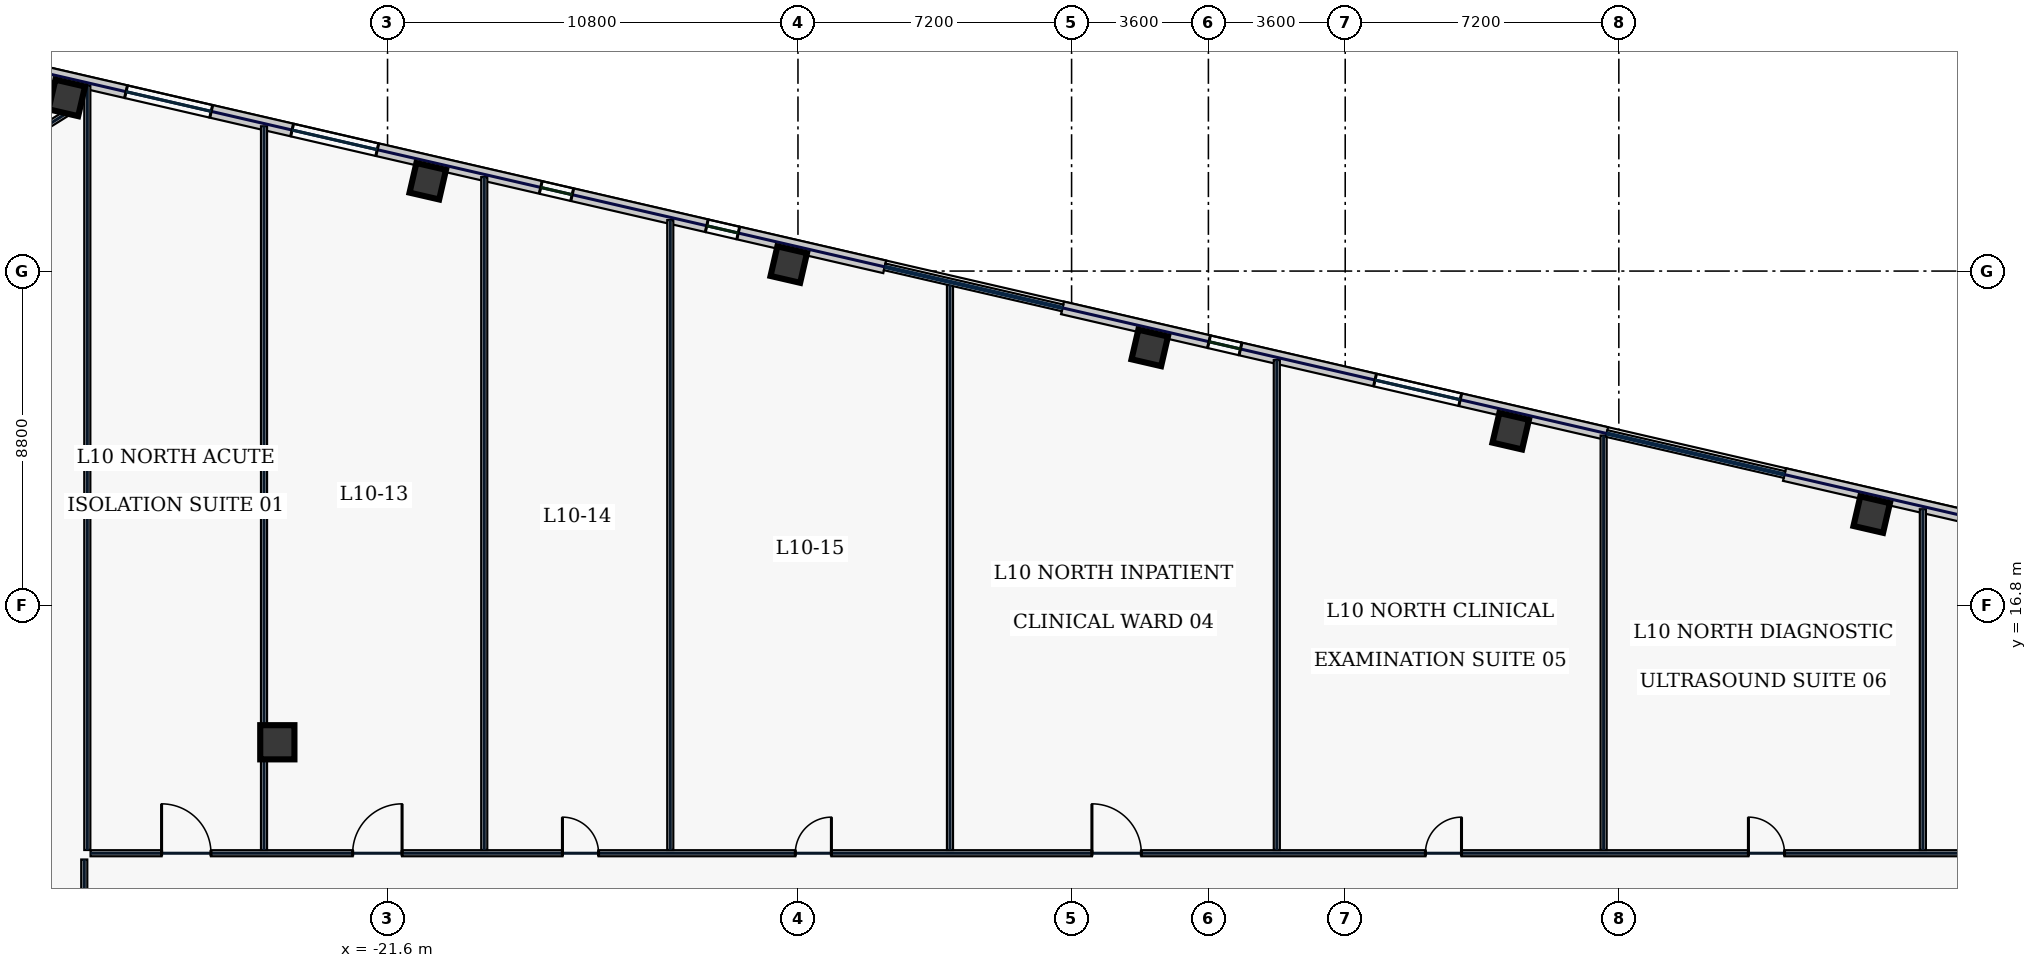
"""IFC4 building model, lengths in metres.
Left out: names, types, materials, properties, quantities, classifications, styles, units other than length and angle.
Written with IfcOpenShell. Run it as: python <this file> out.ifc"""

import sys

from ifc_helpers import new_model, si_unit, direction, frame, frame_2d, origin, origin_2d, place, context, subcontext, project, spatial, rectangle, hollow_rectangle, extrude, element, fill, save


model = new_model("IFC4")
c1 = context("Model", 3, precision=1e-05, world=origin(), true_north=direction((0.0, 1.0)))
c2 = subcontext(c1, "Body", "Model", "MODEL_VIEW")
j1 = project(units=[si_unit("LENGTHUNIT", "METRE"), si_unit("PLANEANGLEUNIT", "RADIAN")], contexts=[c1])
p1 = place(None, origin())
s1 = spatial("IfcSite", under=j1, at=p1, CompositionType="ELEMENT")
p2 = place(p1, origin())
s2 = spatial("IfcBuilding", under=s1, at=p2, CompositionType="ELEMENT")
p3 = place(p2, frame((0.0, 0.0, 51.4)))
s3 = spatial("IfcBuildingStorey", under=s2, at=p3, CompositionType="ELEMENT", Elevation=51.4)
p4 = place(p3, frame((-24.5, 13.2, 0.0), z_axis=(0.0, 0.0, 1.0), x_axis=(1.0, 0.0, 0.0)))
e1 = element("IfcColumn", 1, at=p4, inside=s3, PredefinedType="COLUMN", context=c2, shape_type="SweptSolid", body=[
    extrude(hollow_rectangle(XDim=0.9, YDim=0.9, WallThickness=0.04, at=origin_2d()), origin(), (0.0, 0.0, 1.0), 3.74),
])
for number, where, z_axis, x_axis in (
    (2, (17.454, 19.192, 0.0), (0.0, 0.0, 1.0), (0.974, -0.225, 0.0)),
    (3, (7.955, 21.385, 0.0), (0.0, 0.0, 1.0), (0.974, -0.225, 0.0)),
    (4, (-1.544, 23.578, 0.0), (0.0, 0.0, 1.0), (0.974, -0.225, 0.0)),
    (5, (-11.042, 25.771, 0.0), (0.0, 0.0, 1.0), (0.974, -0.225, 0.0)),
    (6, (-20.541, 27.964, 0.0), (0.0, 0.0, 1.0), (0.974, -0.225, 0.0)),
    (7, (-30.04, 30.156, 0.0), (0.0, 0.0, 1.0), (0.974, -0.225, 0.0)),
):
    element("IfcColumn", number, at=place(p3, frame(where, z_axis=z_axis, x_axis=x_axis)), inside=s3, PredefinedType="COLUMN", context=c2, shape_type="SweptSolid", body=[
        extrude(hollow_rectangle(XDim=0.8, YDim=0.8, WallThickness=0.036, at=origin_2d()), origin(), (0.0, 0.0, 1.0), 3.74),
    ])
p5 = place(p3, frame((37.229, 15.15, 0.0), z_axis=(0.0, 0.0, 1.0), x_axis=(-0.97436993772, 0.224951604723, 0.0)))
e8 = element("IfcWall", 8, at=p5, inside=s3, PredefinedType="STANDARD", context=c2, shape_type="SweptSolid", body=[
    extrude(rectangle(XDim=22.651, YDim=0.34, at=frame_2d((11.326, 0.0))), origin(), (0.0, 0.0, 1.0), 3.74),
])
p6 = place(p5, frame((16.395, 0.0, 0.77)))
e9 = element("IfcOpeningElement", 9, at=p6, cuts=e8, PredefinedType="OPENING", context=c2, shape_type="SweptSolid", body=[
    extrude(rectangle(XDim=0.85, YDim=1.85, at=frame_2d((0.425, 0.925))), frame((0.0, 0.18, 0.0), z_axis=(0.0, -1.0, 0.0), x_axis=(1.0, 0.0, 0.0)), (0.0, 0.0, 1.0), 0.36),
])
p7 = place(p5, frame((13.361, 0.0, 0.77)))
e10 = element("IfcOpeningElement", 10, at=p7, cuts=e8, PredefinedType="OPENING", context=c2, shape_type="SweptSolid", body=[
    extrude(rectangle(XDim=0.85, YDim=1.85, at=frame_2d((0.425, 0.925))), frame((0.0, 0.18, 0.0), z_axis=(0.0, -1.0, 0.0), x_axis=(1.0, 0.0, 0.0)), (0.0, 0.0, 1.0), 0.36),
])
p8 = place(p5, frame((2.162, 0.0, 0.77)))
e11 = element("IfcOpeningElement", 11, at=p8, cuts=e8, PredefinedType="OPENING", context=c2, shape_type="SweptSolid", body=[
    extrude(rectangle(XDim=2.3, YDim=2.1, at=frame_2d((1.15, 1.05))), frame((0.0, 0.18, 0.0), z_axis=(0.0, -1.0, 0.0), x_axis=(1.0, 0.0, 0.0)), (0.0, 0.0, 1.0), 0.36),
])
p9 = place(p3, frame((10.481, 21.325, 0.0), z_axis=(0.0, 0.0, 1.0), x_axis=(-0.974369353393, 0.2249541357, 0.0)))
e12 = element("IfcWall", 12, at=p9, inside=s3, PredefinedType="STANDARD", context=c2, shape_type="SweptSolid", body=[
    extrude(rectangle(XDim=14.697, YDim=0.34, at=frame_2d((7.349, 0.0))), origin(), (0.0, 0.0, 1.0), 3.74),
])
p10 = place(p9, frame((9.891, 0.0, 0.77)))
e13 = element("IfcOpeningElement", 13, at=p10, cuts=e12, PredefinedType="OPENING", context=c2, shape_type="SweptSolid", body=[
    extrude(rectangle(XDim=0.85, YDim=1.85, at=frame_2d((0.425, 0.925))), frame((0.0, 0.18, 0.0), z_axis=(0.0, -1.0, 0.0), x_axis=(1.0, 0.0, 0.0)), (0.0, 0.0, 1.0), 0.36),
])
p11 = place(p9, frame((3.956, 0.0, 0.77)))
e14 = element("IfcOpeningElement", 14, at=p11, cuts=e12, PredefinedType="OPENING", context=c2, shape_type="SweptSolid", body=[
    extrude(rectangle(XDim=2.3, YDim=2.1, at=frame_2d((1.15, 1.05))), frame((0.0, 0.18, 0.0), z_axis=(0.0, -1.0, 0.0), x_axis=(1.0, 0.0, 0.0)), (0.0, 0.0, 1.0), 0.36),
])
p12 = place(p3, frame((-8.517, 25.711, 0.0), z_axis=(0.0, 0.0, 1.0), x_axis=(-0.974372845456, 0.224939009598, 0.0)))
e15 = element("IfcWall", 15, at=p12, inside=s3, PredefinedType="STANDARD", context=c2, shape_type="SweptSolid", body=[
    extrude(rectangle(XDim=22.652, YDim=0.34, at=frame_2d((11.326, 0.0))), origin(), (0.0, 0.0, 1.0), 3.74),
])
p13 = place(p12, frame((18.189, 0.0, 0.77)))
e16 = element("IfcOpeningElement", 16, at=p13, cuts=e15, PredefinedType="OPENING", context=c2, shape_type="SweptSolid", body=[
    extrude(rectangle(XDim=2.3, YDim=2.1, at=frame_2d((1.15, 1.05))), frame((0.0, 0.18, 0.0), z_axis=(0.0, -1.0, 0.0), x_axis=(1.0, 0.0, 0.0)), (0.0, 0.0, 1.0), 0.36),
])
p14 = place(p12, frame((13.705, 0.0, 0.77)))
e17 = element("IfcOpeningElement", 17, at=p14, cuts=e15, PredefinedType="OPENING", context=c2, shape_type="SweptSolid", body=[
    extrude(rectangle(XDim=2.3, YDim=2.1, at=frame_2d((1.15, 1.05))), frame((0.0, 0.18, 0.0), z_axis=(0.0, -1.0, 0.0), x_axis=(1.0, 0.0, 0.0)), (0.0, 0.0, 1.0), 0.36),
])
p15 = place(p12, frame((8.441, 0.0, 0.77)))
e18 = element("IfcOpeningElement", 18, at=p15, cuts=e15, PredefinedType="OPENING", context=c2, shape_type="SweptSolid", body=[
    extrude(rectangle(XDim=0.85, YDim=1.85, at=frame_2d((0.425, 0.925))), frame((0.0, 0.18, 0.0), z_axis=(0.0, -1.0, 0.0), x_axis=(1.0, 0.0, 0.0)), (0.0, 0.0, 1.0), 0.36),
])
p16 = place(p12, frame((3.956, 0.0, 0.77)))
e19 = element("IfcOpeningElement", 19, at=p16, cuts=e15, PredefinedType="OPENING", context=c2, shape_type="SweptSolid", body=[
    extrude(rectangle(XDim=0.85, YDim=1.85, at=frame_2d((0.425, 0.925))), frame((0.0, 0.18, 0.0), z_axis=(0.0, -1.0, 0.0), x_axis=(1.0, 0.0, 0.0)), (0.0, 0.0, 1.0), 0.36),
])
p17 = place(p3, frame((-29.86, 29.868, 0.0), z_axis=(0.0, 0.0, 1.0), x_axis=(-0.848043064089, -0.529927317139, 0.0)))
e20 = element("IfcWall", 20, at=p17, inside=s3, PredefinedType="PARTITIONING", context=c2, shape_type="SweptSolid", body=[
    extrude(rectangle(XDim=7.354, YDim=0.16, at=frame_2d((3.677, 0.0))), origin(), (0.0, 0.0, 1.0), 3.74),
])
p18 = place(p3, frame((-29.58, -10.015, 0.0), z_axis=(0.0, 0.0, 1.0), x_axis=(0.0, 1.0, 0.0)))
e21 = element("IfcWall", 21, at=p18, inside=s3, PredefinedType="PARTITIONING", context=c2, shape_type="SweptSolid", body=[
    extrude(rectangle(XDim=20.13, YDim=0.16, at=frame_2d((10.065, 0.0))), origin(), (0.0, 0.0, 1.0), 3.74),
])
p19 = place(p18, frame((2.169, 0.0, 0.0)))
e22 = element("IfcOpeningElement", 22, at=p19, cuts=e21, PredefinedType="OPENING", context=c2, shape_type="SweptSolid", body=[
    extrude(rectangle(XDim=0.95, YDim=2.2, at=frame_2d((0.475, 1.1))), frame((0.0, 0.09, 0.0), z_axis=(0.0, -1.0, 0.0), x_axis=(1.0, 0.0, 0.0)), (0.0, 0.0, 1.0), 0.18),
])
p20 = place(p18, frame((6.4, 0.0, 0.0)))
e23 = element("IfcOpeningElement", 23, at=p20, cuts=e21, PredefinedType="OPENING", context=c2, shape_type="SweptSolid", body=[
    extrude(rectangle(XDim=0.95, YDim=2.2, at=frame_2d((0.475, 1.1))), frame((0.0, 0.09, 0.0), z_axis=(0.0, -1.0, 0.0), x_axis=(1.0, 0.0, 0.0)), (0.0, 0.0, 1.0), 0.18),
])
p21 = place(p18, frame((11.6, 0.0, 0.0)))
e24 = element("IfcOpeningElement", 24, at=p21, cuts=e21, PredefinedType="OPENING", context=c2, shape_type="SweptSolid", body=[
    extrude(rectangle(XDim=0.95, YDim=2.2, at=frame_2d((0.475, 1.1))), frame((0.0, 0.09, 0.0), z_axis=(0.0, -1.0, 0.0), x_axis=(1.0, 0.0, 0.0)), (0.0, 0.0, 1.0), 0.18),
])
p22 = place(p18, frame((17.131, 0.0, 0.0)))
e25 = element("IfcOpeningElement", 25, at=p22, cuts=e21, PredefinedType="OPENING", context=c2, shape_type="SweptSolid", body=[
    extrude(rectangle(XDim=0.95, YDim=2.2, at=frame_2d((0.475, 1.1))), frame((0.0, 0.09, 0.0), z_axis=(0.0, -1.0, 0.0), x_axis=(1.0, 0.0, 0.0)), (0.0, 0.0, 1.0), 0.18),
])
p23 = place(p3, frame((-29.415, 10.28, 0.0), z_axis=(0.0, 0.0, 1.0), x_axis=(1.0, 0.0, 0.0)))
e26 = element("IfcWall", 26, at=p23, inside=s3, PredefinedType="PARTITIONING", context=c2, shape_type="SweptSolid", body=[
    extrude(rectangle(XDim=58.83, YDim=0.16, at=frame_2d((29.415, 0.0))), origin(), (0.0, 0.0, 1.0), 3.74),
])
p24 = place(p23, frame((1.869, 0.0, 0.0)))
e27 = element("IfcOpeningElement", 27, at=p24, cuts=e26, PredefinedType="OPENING", context=c2, shape_type="SweptSolid", body=[
    extrude(rectangle(XDim=1.3, YDim=2.2, at=frame_2d((0.65, 1.1))), frame((0.0, 0.09, 0.0), z_axis=(0.0, -1.0, 0.0), x_axis=(1.0, 0.0, 0.0)), (0.0, 0.0, 1.0), 0.18),
])
p25 = place(p23, frame((6.897, 0.0, 0.0)))
e28 = element("IfcOpeningElement", 28, at=p25, cuts=e26, PredefinedType="OPENING", context=c2, shape_type="SweptSolid", body=[
    extrude(rectangle(XDim=1.3, YDim=2.2, at=frame_2d((0.65, 1.1))), frame((0.0, 0.09, 0.0), z_axis=(0.0, -1.0, 0.0), x_axis=(1.0, 0.0, 0.0)), (0.0, 0.0, 1.0), 0.18),
])
p26 = place(p23, frame((12.417, 0.0, 0.0)))
e29 = element("IfcOpeningElement", 29, at=p26, cuts=e26, PredefinedType="OPENING", context=c2, shape_type="SweptSolid", body=[
    extrude(rectangle(XDim=0.95, YDim=2.2, at=frame_2d((0.475, 1.1))), frame((0.0, 0.09, 0.0), z_axis=(0.0, -1.0, 0.0), x_axis=(1.0, 0.0, 0.0)), (0.0, 0.0, 1.0), 0.18),
])
p27 = place(p23, frame((18.545, 0.0, 0.0)))
e30 = element("IfcOpeningElement", 30, at=p27, cuts=e26, PredefinedType="OPENING", context=c2, shape_type="SweptSolid", body=[
    extrude(rectangle(XDim=0.95, YDim=2.2, at=frame_2d((0.475, 1.1))), frame((0.0, 0.09, 0.0), z_axis=(0.0, -1.0, 0.0), x_axis=(1.0, 0.0, 0.0)), (0.0, 0.0, 1.0), 0.18),
])
p28 = place(p23, frame((26.35, 0.0, 0.0)))
e31 = element("IfcOpeningElement", 31, at=p28, cuts=e26, PredefinedType="OPENING", context=c2, shape_type="SweptSolid", body=[
    extrude(rectangle(XDim=1.3, YDim=2.2, at=frame_2d((0.65, 1.1))), frame((0.0, 0.09, 0.0), z_axis=(0.0, -1.0, 0.0), x_axis=(1.0, 0.0, 0.0)), (0.0, 0.0, 1.0), 0.18),
])
p29 = place(p23, frame((35.125, 0.0, 0.0)))
e32 = element("IfcOpeningElement", 32, at=p29, cuts=e26, PredefinedType="OPENING", context=c2, shape_type="SweptSolid", body=[
    extrude(rectangle(XDim=0.95, YDim=2.2, at=frame_2d((0.475, 1.1))), frame((0.0, 0.09, 0.0), z_axis=(0.0, -1.0, 0.0), x_axis=(1.0, 0.0, 0.0)), (0.0, 0.0, 1.0), 0.18),
])
p30 = place(p23, frame((43.625, 0.0, 0.0)))
e33 = element("IfcOpeningElement", 33, at=p30, cuts=e26, PredefinedType="OPENING", context=c2, shape_type="SweptSolid", body=[
    extrude(rectangle(XDim=0.95, YDim=2.2, at=frame_2d((0.475, 1.1))), frame((0.0, 0.09, 0.0), z_axis=(0.0, -1.0, 0.0), x_axis=(1.0, 0.0, 0.0)), (0.0, 0.0, 1.0), 0.18),
])
p31 = place(p23, frame((50.85, 0.0, 0.0)))
e34 = element("IfcOpeningElement", 34, at=p31, cuts=e26, PredefinedType="OPENING", context=c2, shape_type="SweptSolid", body=[
    extrude(rectangle(XDim=1.15, YDim=2.2, at=frame_2d((0.575, 1.1))), frame((0.0, 0.09, 0.0), z_axis=(0.0, -1.0, 0.0), x_axis=(1.0, 0.0, 0.0)), (0.0, 0.0, 1.0), 0.18),
])
p32 = place(p23, frame((55.831, 0.0, 0.0)))
e35 = element("IfcOpeningElement", 35, at=p32, cuts=e26, PredefinedType="OPENING", context=c2, shape_type="SweptSolid", body=[
    extrude(rectangle(XDim=1.3, YDim=2.2, at=frame_2d((0.65, 1.1))), frame((0.0, 0.09, 0.0), z_axis=(0.0, -1.0, 0.0), x_axis=(1.0, 0.0, 0.0)), (0.0, 0.0, 1.0), 0.18),
])
p33 = place(p3, frame((-29.5, 10.365, 0.0), z_axis=(0.0, 0.0, 1.0), x_axis=(0.0, 1.0, 0.0)))
e36 = element("IfcWall", 36, at=p33, inside=s3, PredefinedType="PARTITIONING", context=c2, shape_type="SweptSolid", body=[
    extrude(rectangle(XDim=20.119, YDim=0.16, at=frame_2d((10.059, 0.0))), origin(), (0.0, 0.0, 1.0), 3.74),
])
p34 = place(p3, frame((-24.85, 10.365, 0.0), z_axis=(0.0, 0.0, 1.0), x_axis=(0.0, 1.0, 0.0)))
e37 = element("IfcWall", 37, at=p34, inside=s3, PredefinedType="PARTITIONING", context=c2, shape_type="SweptSolid", body=[
    extrude(rectangle(XDim=19.045, YDim=0.16, at=frame_2d((9.522, 0.0))), origin(), (0.0, 0.0, 1.0), 3.74),
])
p35 = place(p3, frame((-14.16, 10.365, 0.0), z_axis=(0.0, 0.0, 1.0), x_axis=(0.0, 1.0, 0.0)))
e38 = element("IfcWall", 38, at=p35, inside=s3, PredefinedType="PARTITIONING", context=c2, shape_type="SweptSolid", body=[
    extrude(rectangle(XDim=16.577, YDim=0.16, at=frame_2d((8.289, 0.0))), origin(), (0.0, 0.0, 1.0), 3.74),
])
p36 = place(p3, frame((-6.8, 10.365, 0.0), z_axis=(0.0, 0.0, 1.0), x_axis=(0.0, 1.0, 0.0)))
e39 = element("IfcWall", 39, at=p36, inside=s3, PredefinedType="PARTITIONING", context=c2, shape_type="SweptSolid", body=[
    extrude(rectangle(XDim=14.878, YDim=0.16, at=frame_2d((7.439, 0.0))), origin(), (0.0, 0.0, 1.0), 3.74),
])
p37 = place(p3, frame((1.8, 10.365, 0.0), z_axis=(0.0, 0.0, 1.0), x_axis=(0.0, 1.0, 0.0)))
e40 = element("IfcWall", 40, at=p37, inside=s3, PredefinedType="PARTITIONING", context=c2, shape_type="SweptSolid", body=[
    extrude(rectangle(XDim=12.892, YDim=0.16, at=frame_2d((6.446, 0.0))), origin(), (0.0, 0.0, 1.0), 3.74),
])
p38 = place(p3, frame((10.4, 10.365, 0.0), z_axis=(0.0, 0.0, 1.0), x_axis=(0.0, 1.0, 0.0)))
e41 = element("IfcWall", 41, at=p38, inside=s3, PredefinedType="PARTITIONING", context=c2, shape_type="SweptSolid", body=[
    extrude(rectangle(XDim=10.907, YDim=0.16, at=frame_2d((5.454, 0.0))), origin(), (0.0, 0.0, 1.0), 3.74),
])
p39 = place(p3, frame((18.8, 10.365, 0.0), z_axis=(0.0, 0.0, 1.0), x_axis=(0.0, 1.0, 0.0)))
e42 = element("IfcWall", 42, at=p39, inside=s3, PredefinedType="PARTITIONING", context=c2, shape_type="SweptSolid", body=[
    extrude(rectangle(XDim=8.968, YDim=0.16, at=frame_2d((4.484, 0.0))), origin(), (0.0, 0.0, 1.0), 3.74),
])
p40 = place(p3, frame((-19.055, 10.365, 0.0), z_axis=(0.0, 0.0, 1.0), x_axis=(0.0, 1.0, 0.0)))
e43 = element("IfcWall", 43, at=p40, inside=s3, PredefinedType="PARTITIONING", context=c2, shape_type="SweptSolid", body=[
    extrude(rectangle(XDim=17.707, YDim=0.16, at=frame_2d((8.854, 0.0))), origin(), (0.0, 0.0, 1.0), 3.74),
])
p41 = place(p10, origin())
e44 = element("IfcWindow", 44, at=p41, inside=s3, PartitioningType="SINGLE_PANEL", PredefinedType="WINDOW", context=c2, shape_type="SweptSolid", body=[
    extrude(rectangle(XDim=0.85, YDim=1.85, at=frame_2d((0.425, 0.925))), frame((0.0, 0.03, 0.0), z_axis=(0.0, -1.0, 0.0), x_axis=(1.0, 0.0, 0.0)), (0.0, 0.0, 1.0), 0.06),
])
fill(e13, e44)
p42 = place(p11, origin())
e45 = element("IfcWindow", 45, at=p42, inside=s3, PartitioningType="SINGLE_PANEL", PredefinedType="WINDOW", context=c2, shape_type="SweptSolid", body=[
    extrude(rectangle(XDim=2.3, YDim=2.1, at=frame_2d((1.15, 1.05))), frame((0.0, 0.03, 0.0), z_axis=(0.0, -1.0, 0.0), x_axis=(1.0, 0.0, 0.0)), (0.0, 0.0, 1.0), 0.06),
])
fill(e14, e45)
p43 = place(p13, origin())
e46 = element("IfcWindow", 46, at=p43, inside=s3, PartitioningType="SINGLE_PANEL", PredefinedType="WINDOW", context=c2, shape_type="SweptSolid", body=[
    extrude(rectangle(XDim=2.3, YDim=2.1, at=frame_2d((1.15, 1.05))), frame((0.0, 0.03, 0.0), z_axis=(0.0, -1.0, 0.0), x_axis=(1.0, 0.0, 0.0)), (0.0, 0.0, 1.0), 0.06),
])
fill(e16, e46)
p44 = place(p14, origin())
e47 = element("IfcWindow", 47, at=p44, inside=s3, PartitioningType="SINGLE_PANEL", PredefinedType="WINDOW", context=c2, shape_type="SweptSolid", body=[
    extrude(rectangle(XDim=2.3, YDim=2.1, at=frame_2d((1.15, 1.05))), frame((0.0, 0.03, 0.0), z_axis=(0.0, -1.0, 0.0), x_axis=(1.0, 0.0, 0.0)), (0.0, 0.0, 1.0), 0.06),
])
fill(e17, e47)
p45 = place(p15, origin())
e48 = element("IfcWindow", 48, at=p45, inside=s3, PartitioningType="SINGLE_PANEL", PredefinedType="WINDOW", context=c2, shape_type="SweptSolid", body=[
    extrude(rectangle(XDim=0.85, YDim=1.85, at=frame_2d((0.425, 0.925))), frame((0.0, 0.03, 0.0), z_axis=(0.0, -1.0, 0.0), x_axis=(1.0, 0.0, 0.0)), (0.0, 0.0, 1.0), 0.06),
])
fill(e18, e48)
p46 = place(p16, origin())
e49 = element("IfcWindow", 49, at=p46, inside=s3, PartitioningType="SINGLE_PANEL", PredefinedType="WINDOW", context=c2, shape_type="SweptSolid", body=[
    extrude(rectangle(XDim=0.85, YDim=1.85, at=frame_2d((0.425, 0.925))), frame((0.0, 0.03, 0.0), z_axis=(0.0, -1.0, 0.0), x_axis=(1.0, 0.0, 0.0)), (0.0, 0.0, 1.0), 0.06),
])
fill(e19, e49)
p47 = place(p24, origin())
e50 = element("IfcDoor", 50, at=p47, inside=s3, OperationType="SINGLE_SWING_LEFT", PredefinedType="DOOR", context=c2, shape_type="SweptSolid", body=[
    extrude(rectangle(XDim=1.3, YDim=2.2, at=frame_2d((0.65, 1.1))), frame((0.0, 0.025, 0.0), z_axis=(0.0, -1.0, 0.0), x_axis=(1.0, 0.0, 0.0)), (0.0, 0.0, 1.0), 0.05),
])
fill(e27, e50)
p48 = place(p25, origin())
e51 = element("IfcDoor", 51, at=p48, inside=s3, OperationType="SINGLE_SWING_RIGHT", PredefinedType="DOOR", context=c2, shape_type="SweptSolid", body=[
    extrude(rectangle(XDim=1.3, YDim=2.2, at=frame_2d((0.65, 1.1))), frame((0.0, 0.025, 0.0), z_axis=(0.0, -1.0, 0.0), x_axis=(1.0, 0.0, 0.0)), (0.0, 0.0, 1.0), 0.05),
])
fill(e28, e51)
p49 = place(p26, origin())
e52 = element("IfcDoor", 52, at=p49, inside=s3, OperationType="SINGLE_SWING_LEFT", PredefinedType="DOOR", context=c2, shape_type="SweptSolid", body=[
    extrude(rectangle(XDim=0.95, YDim=2.2, at=frame_2d((0.475, 1.1))), frame((0.0, 0.025, 0.0), z_axis=(0.0, -1.0, 0.0), x_axis=(1.0, 0.0, 0.0)), (0.0, 0.0, 1.0), 0.05),
])
fill(e29, e52)
p50 = place(p27, origin())
e53 = element("IfcDoor", 53, at=p50, inside=s3, OperationType="SINGLE_SWING_RIGHT", PredefinedType="DOOR", context=c2, shape_type="SweptSolid", body=[
    extrude(rectangle(XDim=0.95, YDim=2.2, at=frame_2d((0.475, 1.1))), frame((0.0, 0.025, 0.0), z_axis=(0.0, -1.0, 0.0), x_axis=(1.0, 0.0, 0.0)), (0.0, 0.0, 1.0), 0.05),
])
fill(e30, e53)
p51 = place(p28, origin())
e54 = element("IfcDoor", 54, at=p51, inside=s3, OperationType="SINGLE_SWING_LEFT", PredefinedType="DOOR", context=c2, shape_type="SweptSolid", body=[
    extrude(rectangle(XDim=1.3, YDim=2.2, at=frame_2d((0.65, 1.1))), frame((0.0, 0.025, 0.0), z_axis=(0.0, -1.0, 0.0), x_axis=(1.0, 0.0, 0.0)), (0.0, 0.0, 1.0), 0.05),
])
fill(e31, e54)
p52 = place(p29, origin())
e55 = element("IfcDoor", 55, at=p52, inside=s3, OperationType="SINGLE_SWING_RIGHT", PredefinedType="DOOR", context=c2, shape_type="SweptSolid", body=[
    extrude(rectangle(XDim=0.95, YDim=2.2, at=frame_2d((0.475, 1.1))), frame((0.0, 0.025, 0.0), z_axis=(0.0, -1.0, 0.0), x_axis=(1.0, 0.0, 0.0)), (0.0, 0.0, 1.0), 0.05),
])
fill(e32, e55)
p53 = place(p30, origin())
e56 = element("IfcDoor", 56, at=p53, inside=s3, OperationType="SINGLE_SWING_LEFT", PredefinedType="DOOR", context=c2, shape_type="SweptSolid", body=[
    extrude(rectangle(XDim=0.95, YDim=2.2, at=frame_2d((0.475, 1.1))), frame((0.0, 0.025, 0.0), z_axis=(0.0, -1.0, 0.0), x_axis=(1.0, 0.0, 0.0)), (0.0, 0.0, 1.0), 0.05),
])
fill(e33, e56)
save(model, sys.argv[1])
